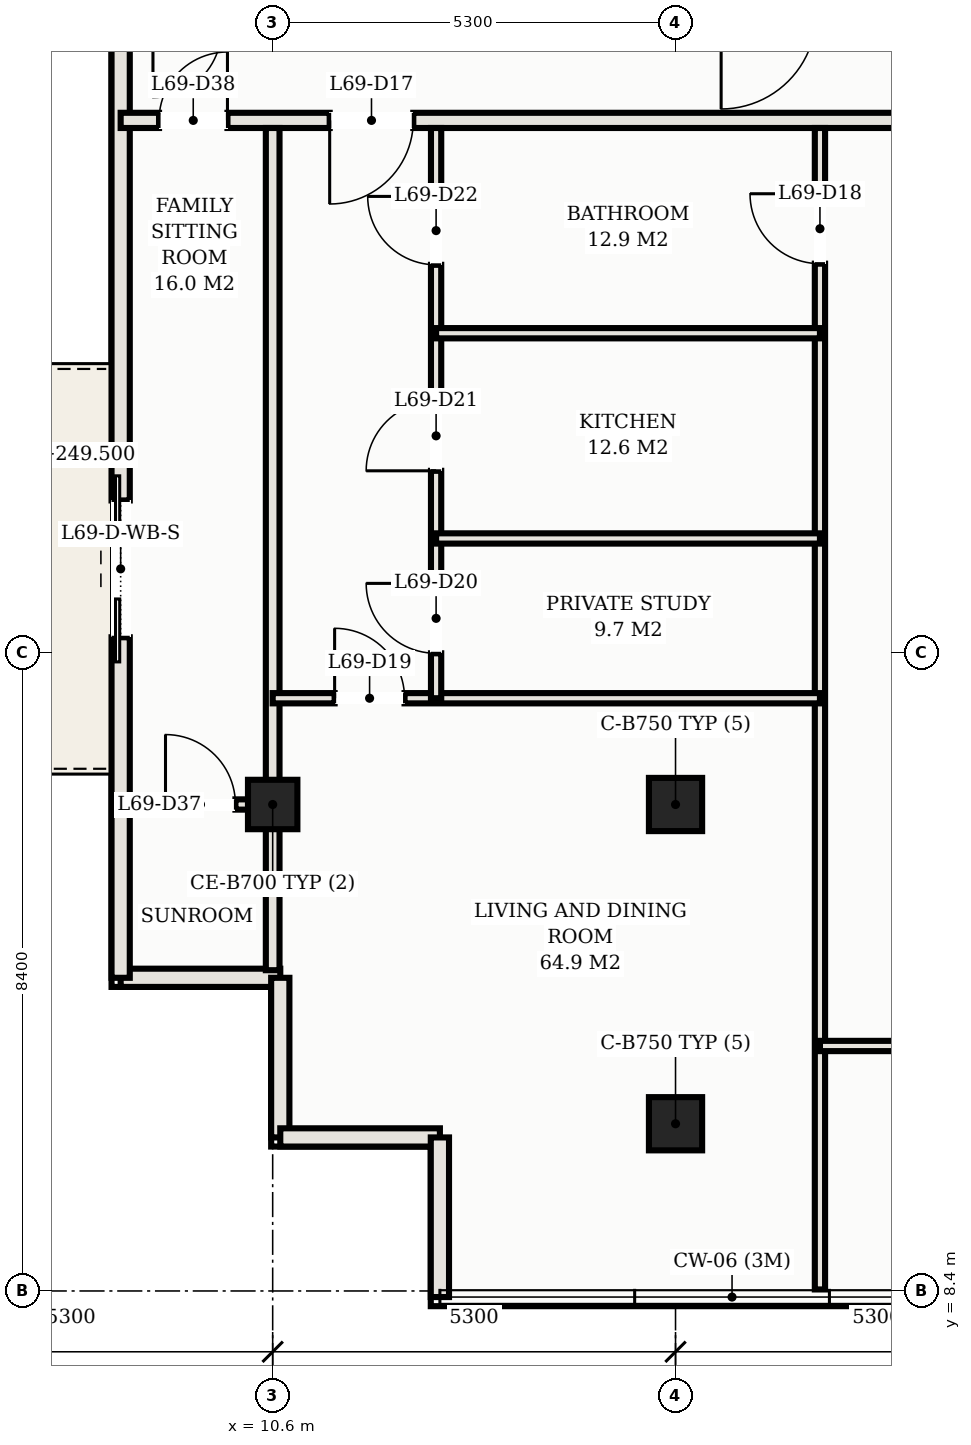
"""IFC4 building model, lengths in metres.
Left out: names, types, materials, properties, quantities, classifications, styles, units other than length and angle.
Written with IfcOpenShell. Run it as: python <this file> out.ifc"""

import sys

from ifc_helpers import new_model, si_unit, direction, frame, frame_2d, origin, origin_2d, place, context, subcontext, project, spatial, rectangle, hollow_rectangle, extrude, element, fill, save


model = new_model("IFC4")
c1 = context("Model", 3, precision=1e-05, world=origin(), true_north=direction((0.0, 1.0)))
c2 = subcontext(c1, "Body", "Model", "MODEL_VIEW")
j1 = project(units=[si_unit("LENGTHUNIT", "METRE"), si_unit("PLANEANGLEUNIT", "RADIAN")], contexts=[c1])
p1 = place(None, origin())
s1 = spatial("IfcSite", under=j1, at=p1, CompositionType="ELEMENT")
p2 = place(p1, origin())
s2 = spatial("IfcBuilding", under=s1, at=p2, CompositionType="ELEMENT")
p3 = place(p2, frame((0.0, 0.0, 249.5)))
s3 = spatial("IfcBuildingStorey", under=s2, at=p3, CompositionType="ELEMENT", Elevation=249.5)
for number, where, z_axis, x_axis in (
    (1, (15.9, 14.8, 0.0), (0.0, 0.0, 1.0), (1.0, 0.0, 0.0)),
    (2, (15.9, 10.6, 0.0), (0.0, 0.0, 1.0), (1.0, 0.0, 0.0)),
):
    element("IfcColumn", number, at=place(p3, frame(where, z_axis=z_axis, x_axis=x_axis)), inside=s3, PredefinedType="COLUMN", context=c2, shape_type="SweptSolid", body=[
        extrude(hollow_rectangle(XDim=0.7, YDim=0.7, WallThickness=0.025, at=origin_2d()), origin(), (0.0, 0.0, 1.0), 3.3),
    ])
p4 = place(p3, frame((10.6, 14.8, 0.0), z_axis=(0.0, 0.0, 1.0), x_axis=(1.0, 0.0, 0.0)))
e3 = element("IfcColumn", 3, at=p4, inside=s3, PredefinedType="COLUMN", context=c2, shape_type="SweptSolid", body=[
    extrude(hollow_rectangle(XDim=0.65, YDim=0.65, WallThickness=0.022, at=origin_2d()), origin(), (0.0, 0.0, 1.0), 3.3),
])
p5 = place(p3, frame((8.6, 12.52, 0.0), z_axis=(0.0, 0.0, 1.0), x_axis=(1.0, 0.0, 0.0)))
e4 = element("IfcWall", 4, at=p5, inside=s3, PredefinedType="SOLIDWALL", context=c2, shape_type="SweptSolid", body=[
    extrude(rectangle(XDim=2.1, YDim=0.24, at=frame_2d((1.05, 0.0))), origin(), (0.0, 0.0, 1.0), 3.11),
])
for number, where, z_axis, x_axis in (
    (5, (10.7, 12.52, 0.0), (0.0, 0.0, 1.0), (0.0, -1.0, 0.0)),
    (6, (10.7, 10.42, 0.0), (0.0, 0.0, 1.0), (1.0, 0.0, 0.0)),
):
    element("IfcWall", number, at=place(p3, frame(where, z_axis=z_axis, x_axis=x_axis)), inside=s3, PredefinedType="SOLIDWALL", context=c2, shape_type="SweptSolid", body=[
        extrude(rectangle(XDim=2.1, YDim=0.24, at=frame_2d((1.05, 0.0))), origin(), (0.0, 0.0, 1.0), 3.11),
    ])
p6 = place(p3, frame((12.8, 10.42, 0.0), z_axis=(0.0, 0.0, 1.0), x_axis=(0.0, -1.0, 0.0)))
e7 = element("IfcWall", 7, at=p6, inside=s3, PredefinedType="SOLIDWALL", context=c2, shape_type="SweptSolid", body=[
    extrude(rectangle(XDim=2.1, YDim=0.24, at=frame_2d((1.05, 0.0))), origin(), (0.0, 0.0, 1.0), 3.11),
])
p7 = place(p3, frame((8.6, 38.53, 0.0), z_axis=(0.0, 0.0, 1.0), x_axis=(0.0, -1.0, 0.0)))
e8 = element("IfcWall", 8, at=p7, inside=s3, PredefinedType="SOLIDWALL", context=c2, shape_type="SweptSolid", body=[
    extrude(rectangle(XDim=26.01, YDim=0.24, at=frame_2d((13.005, 0.0))), origin(), (0.0, 0.0, 1.0), 3.11),
])
p8 = place(p7, frame((19.73, 0.0, 0.0)))
e9 = element("IfcOpeningElement", 9, at=p8, cuts=e8, PredefinedType="OPENING", context=c2, shape_type="SweptSolid", body=[
    extrude(rectangle(XDim=1.8, YDim=2.2, at=frame_2d((0.9, 1.1))), frame((0.0, 0.13, 0.0), z_axis=(0.0, -1.0, 0.0), x_axis=(1.0, 0.0, 0.0)), (0.0, 0.0, 1.0), 0.26),
])
p9 = place(p7, frame((0.45, 0.0, 0.75)))
e10 = element("IfcOpeningElement", 10, at=p9, cuts=e8, PredefinedType="OPENING", context=c2, shape_type="SweptSolid", body=[
    extrude(rectangle(XDim=2.1, YDim=1.65, at=frame_2d((1.05, 0.825))), frame((0.0, 0.13, 0.0), z_axis=(0.0, -1.0, 0.0), x_axis=(1.0, 0.0, 0.0)), (0.0, 0.0, 1.0), 0.26),
])
p10 = place(p3, frame((8.6, 23.8, 0.0), z_axis=(0.0, 0.0, 1.0), x_axis=(1.0, 0.0, 0.0)))
e11 = element("IfcWall", 11, at=p10, inside=s3, PredefinedType="PARTITIONING", context=c2, shape_type="SweptSolid", body=[
    extrude(rectangle(XDim=35.8, YDim=0.2, at=frame_2d((17.9, 0.0))), origin(), (0.0, 0.0, 1.0), 2.45),
])
p11 = place(p10, frame((2.75, 0.0, 0.0)))
e12 = element("IfcOpeningElement", 12, at=p11, cuts=e11, PredefinedType="OPENING", context=c2, shape_type="SweptSolid", body=[
    extrude(rectangle(XDim=1.1, YDim=2.25, at=frame_2d((0.55, 1.125))), frame((0.0, 0.11, 0.0), z_axis=(0.0, -1.0, 0.0), x_axis=(1.0, 0.0, 0.0)), (0.0, 0.0, 1.0), 0.22),
])
p12 = place(p10, frame((18.85, 0.0, 0.0)))
e13 = element("IfcOpeningElement", 13, at=p12, cuts=e11, PredefinedType="OPENING", context=c2, shape_type="SweptSolid", body=[
    extrude(rectangle(XDim=1.1, YDim=2.25, at=frame_2d((0.55, 1.125))), frame((0.0, 0.11, 0.0), z_axis=(0.0, -1.0, 0.0), x_axis=(1.0, 0.0, 0.0)), (0.0, 0.0, 1.0), 0.22),
])
p13 = place(p10, frame((0.505, 0.0, 0.0)))
e14 = element("IfcOpeningElement", 14, at=p13, cuts=e11, PredefinedType="OPENING", context=c2, shape_type="SweptSolid", body=[
    extrude(rectangle(XDim=0.9, YDim=2.15, at=frame_2d((0.45, 1.075))), frame((0.0, 0.11, 0.0), z_axis=(0.0, -1.0, 0.0), x_axis=(1.0, 0.0, 0.0)), (0.0, 0.0, 1.0), 0.22),
])
p14 = place(p10, frame((34.395, 0.0, 0.0)))
e15 = element("IfcOpeningElement", 15, at=p14, cuts=e11, PredefinedType="OPENING", context=c2, shape_type="SweptSolid", body=[
    extrude(rectangle(XDim=0.9, YDim=2.15, at=frame_2d((0.45, 1.075))), frame((0.0, 0.11, 0.0), z_axis=(0.0, -1.0, 0.0), x_axis=(1.0, 0.0, 0.0)), (0.0, 0.0, 1.0), 0.22),
])
p15 = place(p3, frame((10.6, 12.62, 0.0), z_axis=(0.0, 0.0, 1.0), x_axis=(0.0, 1.0, 0.0)))
e16 = element("IfcWall", 16, at=p15, inside=s3, PredefinedType="PARTITIONING", context=c2, shape_type="SweptSolid", body=[
    extrude(rectangle(XDim=11.08, YDim=0.18, at=frame_2d((5.54, 0.0))), origin(), (0.0, 0.0, 1.0), 2.45),
])
p16 = place(p3, frame((17.8, 8.42, 0.0), z_axis=(0.0, 0.0, 1.0), x_axis=(0.0, 1.0, 0.0)))
e17 = element("IfcWall", 17, at=p16, inside=s3, PredefinedType="PARTITIONING", context=c2, shape_type="SweptSolid", body=[
    extrude(rectangle(XDim=15.28, YDim=0.135, at=frame_2d((7.64, 0.0))), origin(), (0.0, 0.0, 1.0), 2.45),
])
p17 = place(p16, frame((13.495, 0.0, 0.0)))
e18 = element("IfcOpeningElement", 18, at=p17, cuts=e17, PredefinedType="OPENING", context=c2, shape_type="SweptSolid", body=[
    extrude(rectangle(XDim=0.92, YDim=2.15, at=frame_2d((0.46, 1.075))), frame((0.0, 0.078, 0.0), z_axis=(0.0, -1.0, 0.0), x_axis=(1.0, 0.0, 0.0)), (0.0, 0.0, 1.0), 0.155),
])
p18 = place(p3, frame((10.6, 16.198, 0.0), z_axis=(0.0, 0.0, 1.0), x_axis=(1.0, 0.0, 0.0)))
e19 = element("IfcWall", 19, at=p18, inside=s3, PredefinedType="PARTITIONING", context=c2, shape_type="SweptSolid", body=[
    extrude(rectangle(XDim=7.2, YDim=0.135, at=frame_2d((3.6, 0.0))), origin(), (0.0, 0.0, 1.0), 2.45),
])
p19 = place(p18, frame((0.815, 0.0, 0.0)))
e20 = element("IfcOpeningElement", 20, at=p19, cuts=e19, PredefinedType="OPENING", context=c2, shape_type="SweptSolid", body=[
    extrude(rectangle(XDim=0.92, YDim=2.15, at=frame_2d((0.46, 1.075))), frame((0.0, 0.078, 0.0), z_axis=(0.0, -1.0, 0.0), x_axis=(1.0, 0.0, 0.0)), (0.0, 0.0, 1.0), 0.155),
])
p20 = place(p3, frame((12.75, 16.198, 0.0), z_axis=(0.0, 0.0, 1.0), x_axis=(0.0, 1.0, 0.0)))
e21 = element("IfcWall", 21, at=p20, inside=s3, PredefinedType="PARTITIONING", context=c2, shape_type="SweptSolid", body=[
    extrude(rectangle(XDim=7.502, YDim=0.135, at=frame_2d((3.751, 0.0))), origin(), (0.0, 0.0, 1.0), 2.45),
])
p21 = place(p20, frame((0.591, 0.0, 0.0)))
e22 = element("IfcOpeningElement", 22, at=p21, cuts=e21, PredefinedType="OPENING", context=c2, shape_type="SweptSolid", body=[
    extrude(rectangle(XDim=0.92, YDim=2.15, at=frame_2d((0.46, 1.075))), frame((0.0, 0.078, 0.0), z_axis=(0.0, -1.0, 0.0), x_axis=(1.0, 0.0, 0.0)), (0.0, 0.0, 1.0), 0.155),
])
p22 = place(p20, frame((2.992, 0.0, 0.0)))
e23 = element("IfcOpeningElement", 23, at=p22, cuts=e21, PredefinedType="OPENING", context=c2, shape_type="SweptSolid", body=[
    extrude(rectangle(XDim=0.92, YDim=2.15, at=frame_2d((0.46, 1.075))), frame((0.0, 0.078, 0.0), z_axis=(0.0, -1.0, 0.0), x_axis=(1.0, 0.0, 0.0)), (0.0, 0.0, 1.0), 0.155),
])
p23 = place(p20, frame((5.702, 0.0, 0.0)))
e24 = element("IfcOpeningElement", 24, at=p23, cuts=e21, PredefinedType="OPENING", context=c2, shape_type="SweptSolid", body=[
    extrude(rectangle(XDim=0.9, YDim=2.15, at=frame_2d((0.45, 1.075))), frame((0.0, 0.078, 0.0), z_axis=(0.0, -1.0, 0.0), x_axis=(1.0, 0.0, 0.0)), (0.0, 0.0, 1.0), 0.155),
])
for number, where, z_axis, x_axis in (
    (25, (12.75, 18.3, 0.0), (0.0, 0.0, 1.0), (1.0, 0.0, 0.0)),
    (26, (12.75, 21.0, 0.0), (0.0, 0.0, 1.0), (1.0, 0.0, 0.0)),
):
    element("IfcWall", number, at=place(p3, frame(where, z_axis=z_axis, x_axis=x_axis)), inside=s3, PredefinedType="PARTITIONING", context=c2, shape_type="SweptSolid", body=[
        extrude(rectangle(XDim=5.05, YDim=0.135, at=frame_2d((2.525, 0.0))), origin(), (0.0, 0.0, 1.0), 2.45),
    ])
p24 = place(p3, frame((17.8, 11.623, 0.0), z_axis=(0.0, 0.0, 1.0), x_axis=(1.0, 0.0, 0.0)))
e27 = element("IfcWall", 27, at=p24, inside=s3, PredefinedType="PARTITIONING", context=c2, shape_type="SweptSolid", body=[
    extrude(rectangle(XDim=8.7, YDim=0.135, at=frame_2d((4.35, 0.0))), origin(), (0.0, 0.0, 1.0), 2.45),
])
p25 = place(p24, frame((1.125, 0.0, 0.0)))
e28 = element("IfcOpeningElement", 28, at=p25, cuts=e27, PredefinedType="OPENING", context=c2, shape_type="SweptSolid", body=[
    extrude(rectangle(XDim=0.95, YDim=2.15, at=frame_2d((0.475, 1.075))), frame((0.0, 0.078, 0.0), z_axis=(0.0, -1.0, 0.0), x_axis=(1.0, 0.0, 0.0)), (0.0, 0.0, 1.0), 0.155),
])
p26 = place(p24, frame((6.45, 0.0, 0.0)))
e29 = element("IfcOpeningElement", 29, at=p26, cuts=e27, PredefinedType="OPENING", context=c2, shape_type="SweptSolid", body=[
    extrude(rectangle(XDim=0.9, YDim=2.15, at=frame_2d((0.45, 1.075))), frame((0.0, 0.078, 0.0), z_axis=(0.0, -1.0, 0.0), x_axis=(1.0, 0.0, 0.0)), (0.0, 0.0, 1.0), 0.155),
])
p27 = place(p3, frame((8.7, 14.8, 0.0), z_axis=(0.0, 0.0, 1.0), x_axis=(1.0, 0.0, 0.0)))
e30 = element("IfcWall", 30, at=p27, inside=s3, PredefinedType="PARTITIONING", context=c2, shape_type="SweptSolid", body=[
    extrude(rectangle(XDim=1.9, YDim=0.135, at=frame_2d((0.95, 0.0))), origin(), (0.0, 0.0, 1.0), 2.45),
])
p28 = place(p27, frame((0.49, 0.0, 0.0)))
e31 = element("IfcOpeningElement", 31, at=p28, cuts=e30, PredefinedType="OPENING", context=c2, shape_type="SweptSolid", body=[
    extrude(rectangle(XDim=0.92, YDim=2.15, at=frame_2d((0.46, 1.075))), frame((0.0, 0.078, 0.0), z_axis=(0.0, -1.0, 0.0), x_axis=(1.0, 0.0, 0.0)), (0.0, 0.0, 1.0), 0.155),
])
p29 = place(p8, frame((1.8, 0.0, 0.0), z_axis=(0.0, 0.0, 1.0), x_axis=(-1.0, 0.0, 0.0)))
e32 = element("IfcDoor", 32, at=p29, inside=s3, OperationType="DOUBLE_DOOR_SLIDING", PredefinedType="DOOR", context=c2, shape_type="SweptSolid", body=[
    extrude(rectangle(XDim=1.8, YDim=2.2, at=frame_2d((0.9, 1.1))), frame((0.0, 0.025, 0.0), z_axis=(0.0, -1.0, 0.0), x_axis=(1.0, 0.0, 0.0)), (0.0, 0.0, 1.0), 0.05),
])
fill(e9, e32)
p30 = place(p11, frame((1.1, 0.0, 0.0), z_axis=(0.0, 0.0, 1.0), x_axis=(-1.0, 0.0, 0.0)))
e33 = element("IfcDoor", 33, at=p30, inside=s3, OperationType="SINGLE_SWING_RIGHT", PredefinedType="DOOR", context=c2, shape_type="SweptSolid", body=[
    extrude(rectangle(XDim=1.1, YDim=2.25, at=frame_2d((0.55, 1.125))), frame((0.0, 0.025, 0.0), z_axis=(0.0, -1.0, 0.0), x_axis=(1.0, 0.0, 0.0)), (0.0, 0.0, 1.0), 0.05),
])
fill(e12, e33)
p31 = place(p17, origin())
e34 = element("IfcDoor", 34, at=p31, inside=s3, OperationType="SINGLE_SWING_RIGHT", PredefinedType="DOOR", context=c2, shape_type="SweptSolid", body=[
    extrude(rectangle(XDim=0.92, YDim=2.15, at=frame_2d((0.46, 1.075))), frame((0.0, 0.025, 0.0), z_axis=(0.0, -1.0, 0.0), x_axis=(1.0, 0.0, 0.0)), (0.0, 0.0, 1.0), 0.05),
])
fill(e18, e34)
p32 = place(p19, origin())
e35 = element("IfcDoor", 35, at=p32, inside=s3, OperationType="SINGLE_SWING_LEFT", PredefinedType="DOOR", context=c2, shape_type="SweptSolid", body=[
    extrude(rectangle(XDim=0.92, YDim=2.15, at=frame_2d((0.46, 1.075))), frame((0.0, 0.025, 0.0), z_axis=(0.0, -1.0, 0.0), x_axis=(1.0, 0.0, 0.0)), (0.0, 0.0, 1.0), 0.05),
])
fill(e20, e35)
p33 = place(p21, origin())
e36 = element("IfcDoor", 36, at=p33, inside=s3, OperationType="SINGLE_SWING_RIGHT", PredefinedType="DOOR", context=c2, shape_type="SweptSolid", body=[
    extrude(rectangle(XDim=0.92, YDim=2.15, at=frame_2d((0.46, 1.075))), frame((0.0, 0.025, 0.0), z_axis=(0.0, -1.0, 0.0), x_axis=(1.0, 0.0, 0.0)), (0.0, 0.0, 1.0), 0.05),
])
fill(e22, e36)
p34 = place(p22, origin())
e37 = element("IfcDoor", 37, at=p34, inside=s3, OperationType="SINGLE_SWING_LEFT", PredefinedType="DOOR", context=c2, shape_type="SweptSolid", body=[
    extrude(rectangle(XDim=0.92, YDim=2.15, at=frame_2d((0.46, 1.075))), frame((0.0, 0.025, 0.0), z_axis=(0.0, -1.0, 0.0), x_axis=(1.0, 0.0, 0.0)), (0.0, 0.0, 1.0), 0.05),
])
fill(e23, e37)
p35 = place(p23, origin())
e38 = element("IfcDoor", 38, at=p35, inside=s3, OperationType="SINGLE_SWING_RIGHT", PredefinedType="DOOR", context=c2, shape_type="SweptSolid", body=[
    extrude(rectangle(XDim=0.9, YDim=2.15, at=frame_2d((0.45, 1.075))), frame((0.0, 0.025, 0.0), z_axis=(0.0, -1.0, 0.0), x_axis=(1.0, 0.0, 0.0)), (0.0, 0.0, 1.0), 0.05),
])
fill(e24, e38)
p36 = place(p28, origin())
e39 = element("IfcDoor", 39, at=p36, inside=s3, OperationType="SINGLE_SWING_LEFT", PredefinedType="DOOR", context=c2, shape_type="SweptSolid", body=[
    extrude(rectangle(XDim=0.92, YDim=2.15, at=frame_2d((0.46, 1.075))), frame((0.0, 0.025, 0.0), z_axis=(0.0, -1.0, 0.0), x_axis=(1.0, 0.0, 0.0)), (0.0, 0.0, 1.0), 0.05),
])
fill(e31, e39)
p37 = place(p13, origin())
e40 = element("IfcDoor", 40, at=p37, inside=s3, OperationType="SINGLE_SWING_RIGHT", PredefinedType="DOOR", context=c2, shape_type="SweptSolid", body=[
    extrude(rectangle(XDim=0.9, YDim=2.15, at=frame_2d((0.45, 1.075))), frame((0.0, 0.025, 0.0), z_axis=(0.0, -1.0, 0.0), x_axis=(1.0, 0.0, 0.0)), (0.0, 0.0, 1.0), 0.05),
])
fill(e14, e40)
save(model, sys.argv[1])
